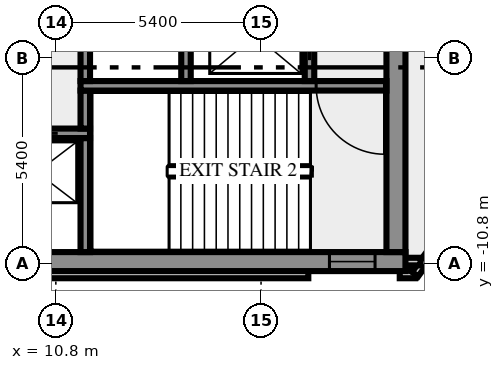
"""IFC4 building model, lengths in metres.
Left out: names, types, materials, properties, quantities, classifications, styles, units other than length and angle.
Written with IfcOpenShell. Run it as: python <this file> out.ifc"""

import sys

from ifc_helpers import new_model, si_unit, direction, frame, frame_2d, origin, place, context, subcontext, project, spatial, rectangle, extrude, element, fill, save


model = new_model("IFC4")
c1 = context("Model", 3, precision=1e-05, world=origin(), true_north=direction((0.0, 1.0)))
c2 = subcontext(c1, "Body", "Model", "MODEL_VIEW")
j1 = project(units=[si_unit("LENGTHUNIT", "METRE"), si_unit("PLANEANGLEUNIT", "RADIAN")], contexts=[c1])
p1 = place(None, origin())
s1 = spatial("IfcSite", under=j1, at=p1, CompositionType="ELEMENT")
p2 = place(p1, origin())
s2 = spatial("IfcBuilding", under=s1, at=p2, CompositionType="ELEMENT")
p3 = place(p2, frame((0.0, 0.0, 226.0)))
s3 = spatial("IfcBuildingStorey", under=s2, at=p3, CompositionType="ELEMENT", Elevation=226.0)
p4 = place(p3, frame((-17.444, -11.088, 0.0), z_axis=(0.0, 0.0, 1.0), x_axis=(1.0, 0.0, 0.0)))
e1 = element("IfcWall", 1, at=p4, inside=s3, PredefinedType="SOLIDWALL", context=c2, shape_type="SweptSolid", body=[
    extrude(rectangle(XDim=34.888, YDim=0.2, at=frame_2d((17.444, 0.0))), origin(), (0.0, 0.0, 1.0), 3.65),
])
p5 = place(p3, frame((19.85, -11.088, 0.0), z_axis=(0.0, 0.0, 1.0), x_axis=(1.0, 0.0, 0.0)))
e2 = element("IfcWall", 2, at=p5, inside=s3, PredefinedType="SOLIDWALL", context=c2, shape_type="SweptSolid", body=[
    extrude(rectangle(XDim=0.406, YDim=0.2, at=frame_2d((0.203, 0.0))), origin(), (0.0, 0.0, 1.0), 3.65),
])
p6 = place(p3, frame((20.253, -11.083, 0.0), z_axis=(0.0, 0.0, 1.0), x_axis=(0.587766567315, 0.809030569476, 0.0)))
e3 = element("IfcWall", 3, at=p6, inside=s3, PredefinedType="SOLIDWALL", context=c2, shape_type="SweptSolid", body=[
    extrude(rectangle(XDim=2.688, YDim=0.2, at=frame_2d((1.344, 0.0))), origin(), (0.0, 0.0, 1.0), 3.65),
])
p7 = place(p3, frame((19.98, -10.75, 0.0), z_axis=(0.0, 0.0, 1.0), x_axis=(1.0, 0.0, 0.0)))
e4 = element("IfcWall", 4, at=p7, inside=s3, PredefinedType="SOLIDWALL", context=c2, shape_type="SweptSolid", body=[
    extrude(rectangle(XDim=0.417, YDim=0.2, at=frame_2d((0.208, 0.0))), origin(), (0.0, 0.0, 1.0), 3.65),
])
p8 = place(p3, frame((-20.0, -10.75, 0.0), z_axis=(0.0, 0.0, 1.0), x_axis=(1.0, 0.0, 0.0)))
e5 = element("IfcWall", 5, at=p8, inside=s3, PredefinedType="SHEAR", context=c2, shape_type="SweptSolid", body=[
    extrude(rectangle(XDim=40.0, YDim=0.5, at=frame_2d((20.0, 0.0))), origin(), (0.0, 0.0, 1.0), 3.65),
])
p9 = place(p8, frame((0.8, 0.0, 1.0)))
e6 = element("IfcOpeningElement", 6, at=p9, cuts=e5, PredefinedType="OPENING", context=c2, shape_type="SweptSolid", body=[
    extrude(rectangle(XDim=1.2, YDim=1.2, at=frame_2d((0.6, 0.6))), frame((0.0, 0.26, 0.0), z_axis=(0.0, -1.0, 0.0), x_axis=(1.0, 0.0, 0.0)), (0.0, 0.0, 1.0), 0.52),
])
p10 = place(p8, frame((38.0, 0.0, 1.0)))
e7 = element("IfcOpeningElement", 7, at=p10, cuts=e5, PredefinedType="OPENING", context=c2, shape_type="SweptSolid", body=[
    extrude(rectangle(XDim=1.2, YDim=1.2, at=frame_2d((0.6, 0.6))), frame((0.0, 0.26, 0.0), z_axis=(0.0, -1.0, 0.0), x_axis=(1.0, 0.0, 0.0)), (0.0, 0.0, 1.0), 0.52),
])
p11 = place(p3, frame((11.575, -10.5, 0.0), z_axis=(0.0, 0.0, 1.0), x_axis=(0.0, 1.0, 0.0)))
e8 = element("IfcWall", 8, at=p11, inside=s3, PredefinedType="SHEAR", context=c2, shape_type="SweptSolid", body=[
    extrude(rectangle(XDim=3.0, YDim=0.25, at=frame_2d((1.5, 0.0))), origin(), (0.0, 0.0, 1.0), 3.65),
])
p12 = place(p3, frame((19.75, -10.5, 0.0), z_axis=(0.0, 0.0, 1.0), x_axis=(0.0, 1.0, 0.0)))
e9 = element("IfcWall", 9, at=p12, inside=s3, PredefinedType="SHEAR", context=c2, shape_type="SweptSolid", body=[
    extrude(rectangle(XDim=8.8, YDim=0.5, at=frame_2d((4.4, 0.0))), origin(), (0.0, 0.0, 1.0), 3.65),
])
p13 = place(p3, frame((11.7, -7.375, 0.0), z_axis=(0.0, 0.0, 1.0), x_axis=(-1.0, 0.0, 0.0)))
e10 = element("IfcWall", 10, at=p13, inside=s3, PredefinedType="SHEAR", context=c2, shape_type="SweptSolid", body=[
    extrude(rectangle(XDim=23.4, YDim=0.25, at=frame_2d((11.7, 0.0))), origin(), (0.0, 0.0, 1.0), 3.65),
])
p14 = place(p13, frame((21.912, 0.0, 0.0)))
e11 = element("IfcOpeningElement", 11, at=p14, cuts=e10, PredefinedType="OPENING", context=c2, shape_type="SweptSolid", body=[
    extrude(rectangle(XDim=0.9, YDim=2.1, at=frame_2d((0.45, 1.05))), frame((0.0, 0.135, 0.0), z_axis=(0.0, -1.0, 0.0), x_axis=(1.0, 0.0, 0.0)), (0.0, 0.0, 1.0), 0.27),
])
p15 = place(p13, frame((19.55, 0.0, 0.0)))
e12 = element("IfcOpeningElement", 12, at=p15, cuts=e10, PredefinedType="OPENING", context=c2, shape_type="SweptSolid", body=[
    extrude(rectangle(XDim=0.9, YDim=2.1, at=frame_2d((0.45, 1.05))), frame((0.0, 0.135, 0.0), z_axis=(0.0, -1.0, 0.0), x_axis=(1.0, 0.0, 0.0)), (0.0, 0.0, 1.0), 0.27),
])
p16 = place(p13, frame((16.688, 0.0, 0.0)))
e13 = element("IfcOpeningElement", 13, at=p16, cuts=e10, PredefinedType="OPENING", context=c2, shape_type="SweptSolid", body=[
    extrude(rectangle(XDim=0.9, YDim=2.1, at=frame_2d((0.45, 1.05))), frame((0.0, 0.135, 0.0), z_axis=(0.0, -1.0, 0.0), x_axis=(1.0, 0.0, 0.0)), (0.0, 0.0, 1.0), 0.27),
])
p17 = place(p13, frame((14.4, 0.0, 0.0)))
e14 = element("IfcOpeningElement", 14, at=p17, cuts=e10, PredefinedType="OPENING", context=c2, shape_type="SweptSolid", body=[
    extrude(rectangle(XDim=0.9, YDim=2.1, at=frame_2d((0.45, 1.05))), frame((0.0, 0.135, 0.0), z_axis=(0.0, -1.0, 0.0), x_axis=(1.0, 0.0, 0.0)), (0.0, 0.0, 1.0), 0.27),
])
p18 = place(p13, frame((12.5, 0.0, 0.0)))
e15 = element("IfcOpeningElement", 15, at=p18, cuts=e10, PredefinedType="OPENING", context=c2, shape_type="SweptSolid", body=[
    extrude(rectangle(XDim=0.9, YDim=2.1, at=frame_2d((0.45, 1.05))), frame((0.0, 0.135, 0.0), z_axis=(0.0, -1.0, 0.0), x_axis=(1.0, 0.0, 0.0)), (0.0, 0.0, 1.0), 0.27),
])
p19 = place(p13, frame((10.6, 0.0, 0.0)))
e16 = element("IfcOpeningElement", 16, at=p19, cuts=e10, PredefinedType="OPENING", context=c2, shape_type="SweptSolid", body=[
    extrude(rectangle(XDim=0.9, YDim=2.1, at=frame_2d((0.45, 1.05))), frame((0.0, 0.135, 0.0), z_axis=(0.0, -1.0, 0.0), x_axis=(1.0, 0.0, 0.0)), (0.0, 0.0, 1.0), 0.27),
])
p20 = place(p13, frame((8.35, 0.0, 0.0)))
e17 = element("IfcOpeningElement", 17, at=p20, cuts=e10, PredefinedType="OPENING", context=c2, shape_type="SweptSolid", body=[
    extrude(rectangle(XDim=1.1, YDim=2.1, at=frame_2d((0.55, 1.05))), frame((0.0, 0.135, 0.0), z_axis=(0.0, -1.0, 0.0), x_axis=(1.0, 0.0, 0.0)), (0.0, 0.0, 1.0), 0.27),
])
p21 = place(p13, frame((5.85, 0.0, 0.0)))
e18 = element("IfcOpeningElement", 18, at=p21, cuts=e10, PredefinedType="OPENING", context=c2, shape_type="SweptSolid", body=[
    extrude(rectangle(XDim=1.1, YDim=2.1, at=frame_2d((0.55, 1.05))), frame((0.0, 0.135, 0.0), z_axis=(0.0, -1.0, 0.0), x_axis=(1.0, 0.0, 0.0)), (0.0, 0.0, 1.0), 0.27),
])
p22 = place(p13, frame((3.35, 0.0, 0.0)))
e19 = element("IfcOpeningElement", 19, at=p22, cuts=e10, PredefinedType="OPENING", context=c2, shape_type="SweptSolid", body=[
    extrude(rectangle(XDim=1.1, YDim=2.1, at=frame_2d((0.55, 1.05))), frame((0.0, 0.135, 0.0), z_axis=(0.0, -1.0, 0.0), x_axis=(1.0, 0.0, 0.0)), (0.0, 0.0, 1.0), 0.27),
])
p23 = place(p13, frame((0.85, 0.0, 0.0)))
e20 = element("IfcOpeningElement", 20, at=p23, cuts=e10, PredefinedType="OPENING", context=c2, shape_type="SweptSolid", body=[
    extrude(rectangle(XDim=1.1, YDim=2.1, at=frame_2d((0.55, 1.05))), frame((0.0, 0.135, 0.0), z_axis=(0.0, -1.0, 0.0), x_axis=(1.0, 0.0, 0.0)), (0.0, 0.0, 1.0), 0.27),
])
p24 = place(p3, frame((11.575, -7.25, 0.0), z_axis=(0.0, 0.0, 1.0), x_axis=(0.0, 1.0, 0.0)))
e21 = element("IfcWall", 21, at=p24, inside=s3, PredefinedType="SHEAR", context=c2, shape_type="SweptSolid", body=[
    extrude(rectangle(XDim=1.0, YDim=0.25, at=frame_2d((0.5, 0.0))), origin(), (0.0, 0.0, 1.0), 3.65),
])
p25 = place(p3, frame((19.5, -6.125, 0.0), z_axis=(0.0, 0.0, 1.0), x_axis=(-1.0, 0.0, 0.0)))
e22 = element("IfcWall", 22, at=p25, inside=s3, PredefinedType="SHEAR", context=c2, shape_type="SweptSolid", body=[
    extrude(rectangle(XDim=8.05, YDim=0.25, at=frame_2d((4.025, 0.0))), origin(), (0.0, 0.0, 1.0), 3.65),
])
p26 = place(p25, frame((0.05, 0.0, 0.0)))
e23 = element("IfcOpeningElement", 23, at=p26, cuts=e22, PredefinedType="OPENING", context=c2, shape_type="SweptSolid", body=[
    extrude(rectangle(XDim=1.8, YDim=2.1, at=frame_2d((0.9, 1.05))), frame((0.0, 0.135, 0.0), z_axis=(0.0, -1.0, 0.0), x_axis=(1.0, 0.0, 0.0)), (0.0, 0.0, 1.0), 0.27),
])
p27 = place(p3, frame((11.575, -6.0, 0.0), z_axis=(0.0, 0.0, 1.0), x_axis=(0.0, 1.0, 0.0)))
e24 = element("IfcWall", 24, at=p27, inside=s3, PredefinedType="SHEAR", context=c2, shape_type="SweptSolid", body=[
    extrude(rectangle(XDim=1.75, YDim=0.25, at=frame_2d((0.875, 0.0))), origin(), (0.0, 0.0, 1.0), 3.65),
])
p28 = place(p3, frame((14.225, -6.0, 0.0), z_axis=(0.0, 0.0, 1.0), x_axis=(0.0, 1.0, 0.0)))
e25 = element("IfcWall", 25, at=p28, inside=s3, PredefinedType="SHEAR", context=c2, shape_type="SweptSolid", body=[
    extrude(rectangle(XDim=4.3, YDim=0.25, at=frame_2d((2.15, 0.0))), origin(), (0.0, 0.0, 1.0), 3.65),
])
p29 = place(p3, frame((17.475, -6.0, 0.0), z_axis=(0.0, 0.0, 1.0), x_axis=(0.0, 1.0, 0.0)))
e26 = element("IfcWall", 26, at=p29, inside=s3, PredefinedType="SHEAR", context=c2, shape_type="SweptSolid", body=[
    extrude(rectangle(XDim=4.3, YDim=0.25, at=frame_2d((2.15, 0.0))), origin(), (0.0, 0.0, 1.0), 3.65),
])
p30 = place(p29, frame((0.55, 0.0, 0.0)))
e27 = element("IfcOpeningElement", 27, at=p30, cuts=e26, PredefinedType="OPENING", context=c2, shape_type="SweptSolid", body=[
    extrude(rectangle(XDim=1.3, YDim=2.1, at=frame_2d((0.65, 1.05))), frame((0.0, 0.135, 0.0), z_axis=(0.0, -1.0, 0.0), x_axis=(1.0, 0.0, 0.0)), (0.0, 0.0, 1.0), 0.27),
])
p31 = place(p10, origin())
e28 = element("IfcWindow", 28, at=p31, inside=s3, PartitioningType="SINGLE_PANEL", PredefinedType="WINDOW", context=c2, shape_type="SweptSolid", body=[
    extrude(rectangle(XDim=1.2, YDim=1.2, at=frame_2d((0.6, 0.6))), frame((0.0, 0.03, 0.0), z_axis=(0.0, -1.0, 0.0), x_axis=(1.0, 0.0, 0.0)), (0.0, 0.0, 1.0), 0.06),
])
fill(e7, e28)
p32 = place(p23, origin())
e29 = element("IfcDoor", 29, at=p32, inside=s3, OperationType="DOUBLE_DOOR_SLIDING", PredefinedType="DOOR", context=c2, shape_type="SweptSolid", body=[
    extrude(rectangle(XDim=1.1, YDim=2.1, at=frame_2d((0.55, 1.05))), frame((0.0, 0.025, 0.0), z_axis=(0.0, -1.0, 0.0), x_axis=(1.0, 0.0, 0.0)), (0.0, 0.0, 1.0), 0.05),
])
fill(e20, e29)
p33 = place(p26, origin())
e30 = element("IfcDoor", 30, at=p33, inside=s3, OperationType="DOUBLE_DOOR_SINGLE_SWING", PredefinedType="DOOR", context=c2, shape_type="SweptSolid", body=[
    extrude(rectangle(XDim=1.8, YDim=2.1, at=frame_2d((0.9, 1.05))), frame((0.0, 0.025, 0.0), z_axis=(0.0, -1.0, 0.0), x_axis=(1.0, 0.0, 0.0)), (0.0, 0.0, 1.0), 0.05),
])
fill(e23, e30)
p34 = place(p30, origin())
e31 = element("IfcDoor", 31, at=p34, inside=s3, OperationType="DOUBLE_DOOR_SLIDING", PredefinedType="DOOR", context=c2, shape_type="SweptSolid", body=[
    extrude(rectangle(XDim=1.3, YDim=2.1, at=frame_2d((0.65, 1.05))), frame((0.0, 0.025, 0.0), z_axis=(0.0, -1.0, 0.0), x_axis=(1.0, 0.0, 0.0)), (0.0, 0.0, 1.0), 0.05),
])
fill(e27, e31)
save(model, sys.argv[1])
